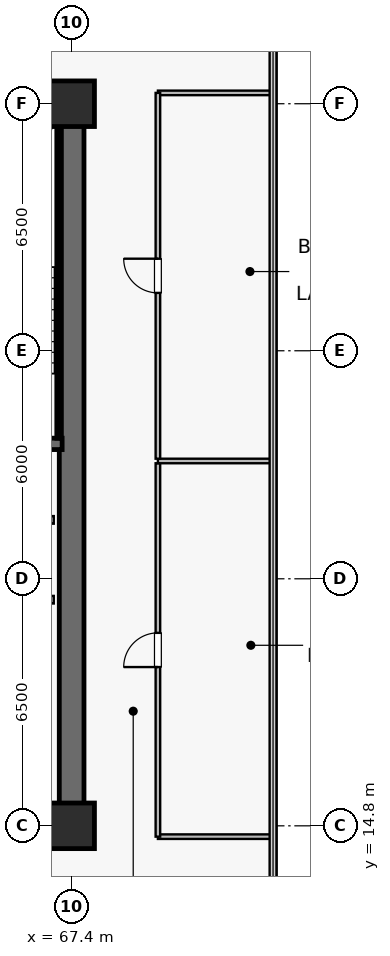
"""IFC4 building model, lengths in metres.
Left out: names, types, materials, properties, quantities, classifications, styles, units other than length and angle.
Written with IfcOpenShell. Run it as: python <this file> out.ifc"""

import sys

from ifc_helpers import new_model, si_unit, direction, frame, frame_2d, origin, origin_2d, place, context, subcontext, project, spatial, rectangle, extrude, source, transform, mapped, element, fill, save


model = new_model("IFC4")
c1 = context("Model", 3, precision=1e-05, world=origin(), true_north=direction((0.0, 1.0)))
c2 = subcontext(c1, "Body", "Model", "MODEL_VIEW")
j1 = project(units=[si_unit("LENGTHUNIT", "METRE"), si_unit("PLANEANGLEUNIT", "RADIAN")], contexts=[c1])
p1 = place(None, origin())
s1 = spatial("IfcSite", under=j1, at=p1, CompositionType="ELEMENT")
p2 = place(p1, origin())
s2 = spatial("IfcBuilding", under=s1, at=p2, CompositionType="ELEMENT")
p3 = place(p2, frame((0.0, 0.0, 158.4)))
s3 = spatial("IfcBuildingStorey", under=s2, at=p3, CompositionType="ELEMENT", Elevation=158.4)
p4 = place(p3, frame((52.275, 14.8, 0.0), z_axis=(0.0, 0.0, 1.0), x_axis=(1.0, 0.0, 0.0)))
e1 = element("IfcWall", 1, at=p4, inside=s3, PredefinedType="SHEAR", context=c2, shape_type="SweptSolid", body=[
    extrude(rectangle(XDim=15.45, YDim=0.65, at=frame_2d((7.725, 0.0))), origin(), (0.0, 0.0, 1.0), 3.79),
])
p5 = place(p3, frame((52.275, 33.8, 0.0), z_axis=(0.0, 0.0, 1.0), x_axis=(1.0, 0.0, 0.0)))
e2 = element("IfcWall", 2, at=p5, inside=s3, PredefinedType="SHEAR", context=c2, shape_type="SweptSolid", body=[
    extrude(rectangle(XDim=15.45, YDim=0.65, at=frame_2d((7.725, 0.0))), origin(), (0.0, 0.0, 1.0), 3.79),
])
p6 = place(p5, frame((6.125, 0.0, 0.0)))
e3 = element("IfcOpeningElement", 3, at=p6, cuts=e2, PredefinedType="OPENING", context=c2, shape_type="SweptSolid", body=[
    extrude(rectangle(XDim=0.95, YDim=2.15, at=frame_2d((0.475, 1.075))), frame((0.0, 0.335, 0.0), z_axis=(0.0, -1.0, 0.0), x_axis=(1.0, 0.0, 0.0)), (0.0, 0.0, 1.0), 0.67),
])
p7 = place(p5, frame((2.585, 0.0, 0.0)))
e4 = element("IfcOpeningElement", 4, at=p7, cuts=e2, PredefinedType="OPENING", context=c2, shape_type="SweptSolid", body=[
    extrude(rectangle(XDim=0.95, YDim=2.15, at=frame_2d((0.475, 1.075))), frame((0.0, 0.335, 0.0), z_axis=(0.0, -1.0, 0.0), x_axis=(1.0, 0.0, 0.0)), (0.0, 0.0, 1.0), 0.67),
])
p8 = place(p3, frame((67.4, 15.125, 0.0), z_axis=(0.0, 0.0, 1.0), x_axis=(0.0, 1.0, 0.0)))
e5 = element("IfcWall", 5, at=p8, inside=s3, PredefinedType="SHEAR", context=c2, shape_type="SweptSolid", body=[
    extrude(rectangle(XDim=18.35, YDim=0.65, at=frame_2d((9.175, 0.0))), origin(), (0.0, 0.0, 1.0), 3.79),
])
p9 = place(p3, frame((63.35, 24.85, 0.0), z_axis=(0.0, 0.0, 1.0), x_axis=(1.0, 0.0, 0.0)))
e6 = element("IfcWall", 6, at=p9, inside=s3, PredefinedType="SHEAR", context=c2, shape_type="SweptSolid", body=[
    extrude(rectangle(XDim=3.8, YDim=0.3, at=frame_2d((1.9, 0.0))), origin(), (0.0, 0.0, 1.0), 3.79),
])
p10 = place(p3, frame((63.35, 33.4, 0.0), z_axis=(0.0, 0.0, 1.0), x_axis=(1.0, 0.0, 0.0)))
e7 = element("IfcWall", 7, at=p10, inside=s3, PredefinedType="SOLIDWALL", context=c2, shape_type="SweptSolid", body=[
    extrude(rectangle(XDim=3.72, YDim=0.12, at=frame_2d((1.86, 0.0))), origin(), (0.0, 0.0, 1.0), 3.79),
])
p11 = place(p3, frame((67.07, 25.0, 0.0), z_axis=(0.0, 0.0, 1.0), x_axis=(0.0, 1.0, 0.0)))
e8 = element("IfcWall", 8, at=p11, inside=s3, PredefinedType="SOLIDWALL", context=c2, shape_type="SweptSolid", body=[
    extrude(rectangle(XDim=8.32, YDim=0.12, at=frame_2d((4.16, 0.0))), origin(), (0.0, 0.0, 1.0), 3.79),
])
m1 = source(origin(), c2, "Body", "SweptSolid", [
    extrude(rectangle(XDim=1.2, YDim=1.2, at=origin_2d()), origin(), (0.0, 0.0, 1.0), 4.1),
])
for number, where, z_axis, x_axis in (
    (9, (67.4, 14.8, 0.0), (0.0, 0.0, 1.0), (1.0, 0.0, 0.0)),
    (10, (67.4, 33.8, 0.0), (0.0, 0.0, 1.0), (1.0, 0.0, 0.0)),
):
    element("IfcColumn", number, at=place(p3, frame(where, z_axis=z_axis, x_axis=x_axis)), inside=s3, PredefinedType="COLUMN", context=c2, shape_type="MappedRepresentation", body=[
        mapped(m1, transform((0.0, 0.0, 0.0), scale=1.0)),
    ])
for number, where, z_axis, x_axis in (
    (11, (64.67, 20.75, 0.0), (0.0, 0.0, 1.0), (1.0, 0.0, 0.0)),
    (12, (64.67, 22.85, 0.0), (0.0, 0.0, 1.0), (1.0, 0.0, 0.0)),
):
    element("IfcWall", number, at=place(p3, frame(where, z_axis=z_axis, x_axis=x_axis)), inside=s3, PredefinedType="SOLIDWALL", context=c2, shape_type="SweptSolid", body=[
        extrude(rectangle(XDim=2.26, YDim=0.2, at=frame_2d((1.13, 0.0))), origin(), (0.0, 0.0, 1.0), 3.79),
    ])
for number, where, z_axis, x_axis in (
    (13, (69.67, 14.515, 0.0), (0.0, 0.0, 1.0), (1.0, 0.0, 0.0)),
    (14, (69.67, 34.085, 0.0), (0.0, 0.0, 1.0), (1.0, 0.0, 0.0)),
):
    element("IfcWall", number, at=place(p3, frame(where, z_axis=z_axis, x_axis=x_axis)), inside=s3, PredefinedType="PARTITIONING", context=c2, shape_type="SweptSolid", body=[
        extrude(rectangle(XDim=3.02, YDim=0.12, at=frame_2d((1.51, 0.0))), origin(), (0.0, 0.0, 1.0), 3.79),
    ])
p12 = place(p3, frame((69.67, 14.515, 0.0), z_axis=(0.0, 0.0, 1.0), x_axis=(0.0, 1.0, 0.0)))
e15 = element("IfcWall", 15, at=p12, inside=s3, PredefinedType="PARTITIONING", context=c2, shape_type="SweptSolid", body=[
    extrude(rectangle(XDim=9.825, YDim=0.12, at=frame_2d((4.913, 0.0))), origin(), (0.0, 0.0, 1.0), 3.79),
])
p13 = place(p12, frame((4.462, 0.0, 0.0)))
e16 = element("IfcOpeningElement", 16, at=p13, cuts=e15, PredefinedType="OPENING", context=c2, shape_type="SweptSolid", body=[
    extrude(rectangle(XDim=0.9, YDim=2.1, at=frame_2d((0.45, 1.05))), frame((0.0, 0.07, 0.0), z_axis=(0.0, -1.0, 0.0), x_axis=(1.0, 0.0, 0.0)), (0.0, 0.0, 1.0), 0.14),
])
p14 = place(p3, frame((69.67, 24.4, 0.0), z_axis=(0.0, 0.0, 1.0), x_axis=(1.0, 0.0, 0.0)))
e17 = element("IfcWall", 17, at=p14, inside=s3, PredefinedType="PARTITIONING", context=c2, shape_type="SweptSolid", body=[
    extrude(rectangle(XDim=3.02, YDim=0.12, at=frame_2d((1.51, 0.0))), origin(), (0.0, 0.0, 1.0), 3.79),
])
p15 = place(p3, frame((69.67, 24.46, 0.0), z_axis=(0.0, 0.0, 1.0), x_axis=(0.0, 1.0, 0.0)))
e18 = element("IfcWall", 18, at=p15, inside=s3, PredefinedType="PARTITIONING", context=c2, shape_type="SweptSolid", body=[
    extrude(rectangle(XDim=9.625, YDim=0.12, at=frame_2d((4.812, 0.0))), origin(), (0.0, 0.0, 1.0), 3.79),
])
p16 = place(p15, frame((4.363, 0.0, 0.0)))
e19 = element("IfcOpeningElement", 19, at=p16, cuts=e18, PredefinedType="OPENING", context=c2, shape_type="SweptSolid", body=[
    extrude(rectangle(XDim=0.9, YDim=2.1, at=frame_2d((0.45, 1.05))), frame((0.0, 0.07, 0.0), z_axis=(0.0, -1.0, 0.0), x_axis=(1.0, 0.0, 0.0)), (0.0, 0.0, 1.0), 0.14),
])
m2 = source(origin(), c2, "Body", "SweptSolid", [
    extrude(rectangle(XDim=0.9, YDim=2.1, at=frame_2d((0.45, 1.05))), frame((0.0, 0.025, 0.0), z_axis=(0.0, -1.0, 0.0), x_axis=(1.0, 0.0, 0.0)), (0.0, 0.0, 1.0), 0.05),
])
p17 = place(p13, origin())
e20 = element("IfcDoor", 20, at=p17, inside=s3, OperationType="SINGLE_SWING_LEFT", PredefinedType="DOOR", context=c2, shape_type="MappedRepresentation", body=[
    mapped(m2, transform((0.0, 0.0, 0.0), scale=1.0)),
])
fill(e16, e20)
p18 = place(p16, origin())
e21 = element("IfcDoor", 21, at=p18, inside=s3, OperationType="SINGLE_SWING_RIGHT", PredefinedType="DOOR", context=c2, shape_type="MappedRepresentation", body=[
    mapped(m2, transform((0.0, 0.0, 0.0), scale=1.0)),
])
fill(e19, e21)
save(model, sys.argv[1])
